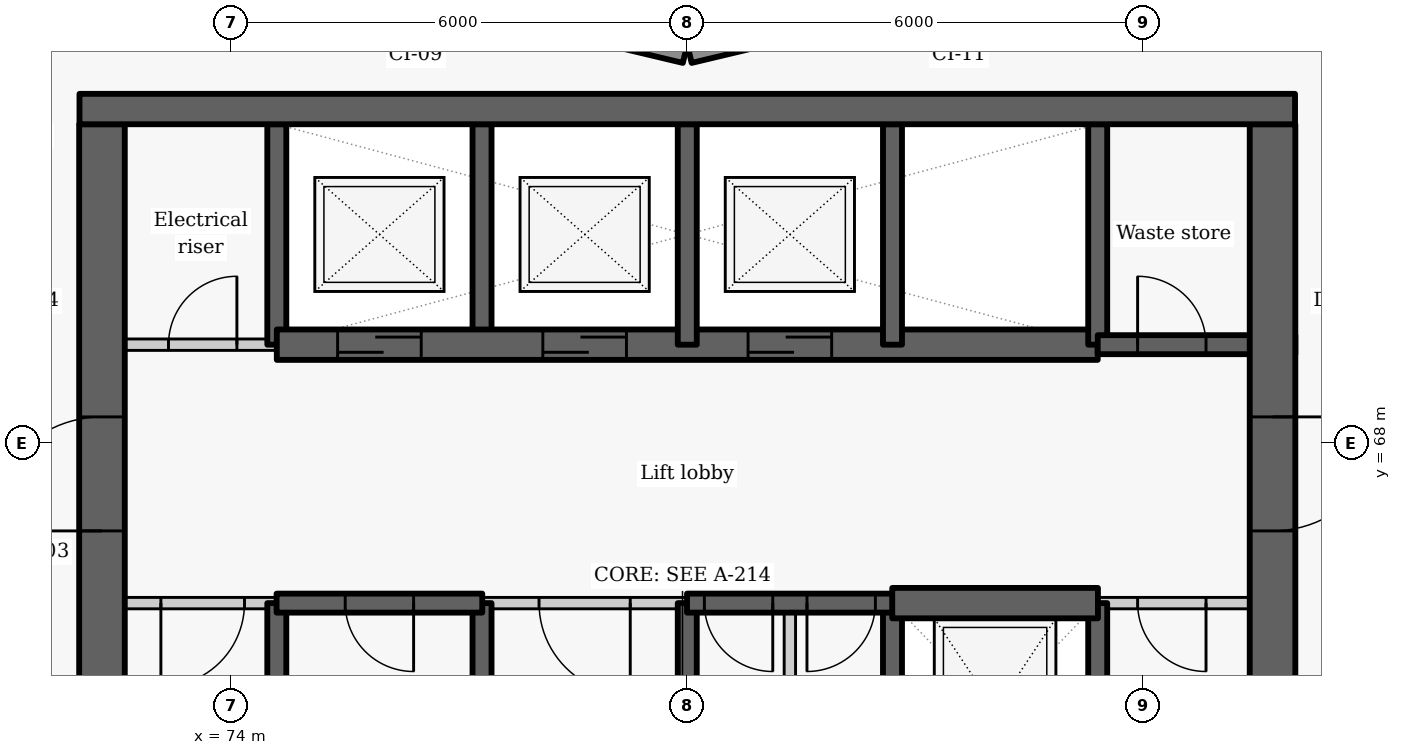
"""IFC4 building model, lengths in metres.
Left out: names, types, materials, properties, quantities, classifications, styles, units other than length and angle.
Written with IfcOpenShell. Run it as: python <this file> out.ifc"""

import sys

from ifc_helpers import new_model, si_unit, direction, frame, frame_2d, origin, place, context, subcontext, project, spatial, rectangle, extrude, element, fill, save


model = new_model("IFC4")
c1 = context("Model", 3, precision=1e-05, world=origin(), true_north=direction((0.0, 1.0)))
c2 = subcontext(c1, "Body", "Model", "MODEL_VIEW")
j1 = project(units=[si_unit("LENGTHUNIT", "METRE"), si_unit("PLANEANGLEUNIT", "RADIAN")], contexts=[c1])
p1 = place(None, origin())
s1 = spatial("IfcSite", under=j1, at=p1, CompositionType="ELEMENT")
p2 = place(p1, origin())
s2 = spatial("IfcBuilding", under=s1, at=p2, CompositionType="ELEMENT")
p3 = place(p2, frame((0.0, 0.0, 67.8)))
s3 = spatial("IfcBuildingStorey", under=s2, at=p3, CompositionType="ELEMENT", Elevation=67.8)
for number, where, z_axis, x_axis in (
    (1, (83.186, 73.881, 0.0), (0.0, 0.0, 1.0), (-0.973, -0.232, 0.0)),
    (2, (79.971, 73.128, 0.0), (0.0, 0.0, 1.0), (-0.973, 0.232, 0.0)),
):
    element("IfcWall", number, at=place(p3, frame(where, z_axis=z_axis, x_axis=x_axis)), inside=s3, PredefinedType="SOLIDWALL", context=c2, shape_type="SweptSolid", body=[
        extrude(rectangle(XDim=3.246, YDim=0.25, at=frame_2d((1.623, 0.0))), origin(), (0.0, 0.0, 1.0), 2.05),
    ])
p4 = place(p3, frame((74.6, 63.1, -0.275), z_axis=(0.0, 0.0, 1.0), x_axis=(0.0, 1.0, 0.0)))
e3 = element("IfcWall", 3, at=p4, inside=s3, PredefinedType="SHEAR", context=c2, shape_type="SweptSolid", body=[
    extrude(rectangle(XDim=2.8, YDim=0.25, at=frame_2d((1.4, 0.0))), origin(), (0.0, 0.0, 1.0), 3.225),
])
p5 = place(p3, frame((74.6, 69.3, -0.275), z_axis=(0.0, 0.0, 1.0), x_axis=(0.0, 1.0, 0.0)))
e4 = element("IfcWall", 4, at=p5, inside=s3, PredefinedType="SHEAR", context=c2, shape_type="SweptSolid", body=[
    extrude(rectangle(XDim=2.9, YDim=0.25, at=frame_2d((1.45, 0.0))), origin(), (0.0, 0.0, 1.0), 3.225),
])
p6 = place(p3, frame((72.0, 69.3, 0.0), z_axis=(0.0, 0.0, 1.0), x_axis=(1.0, 0.0, 0.0)))
e5 = element("IfcWall", 5, at=p6, inside=s3, PredefinedType="PARTITIONING", context=c2, shape_type="SweptSolid", body=[
    extrude(rectangle(XDim=2.6, YDim=0.15, at=frame_2d((1.3, 0.0))), origin(), (0.0, 0.0, 1.0), 2.95),
])
p7 = place(p6, frame((1.175, 0.0, 0.0)))
e6 = element("IfcOpeningElement", 6, at=p7, cuts=e5, PredefinedType="OPENING", context=c2, shape_type="SweptSolid", body=[
    extrude(rectangle(XDim=0.9, YDim=2.1, at=frame_2d((0.45, 1.05))), frame((0.0, 0.085, 0.0), z_axis=(0.0, -1.0, 0.0), x_axis=(1.0, 0.0, 0.0)), (0.0, 0.0, 1.0), 0.17),
])
p8 = place(p3, frame((72.3, 63.1, -0.275), z_axis=(0.0, 0.0, 1.0), x_axis=(0.0, 1.0, 0.0)))
e7 = element("IfcWall", 7, at=p8, inside=s3, PredefinedType="SHEAR", context=c2, shape_type="SweptSolid", body=[
    extrude(rectangle(XDim=9.1, YDim=0.6, at=frame_2d((4.55, 0.0))), origin(), (0.0, 0.0, 1.0), 3.225),
])
p9 = place(p8, frame((3.75, 0.0, 0.275)))
e8 = element("IfcOpeningElement", 8, at=p9, cuts=e7, PredefinedType="OPENING", context=c2, shape_type="SweptSolid", body=[
    extrude(rectangle(XDim=1.5, YDim=2.1, at=frame_2d((0.75, 1.05))), frame((0.0, 0.31, 0.0), z_axis=(0.0, -1.0, 0.0), x_axis=(1.0, 0.0, 0.0)), (0.0, 0.0, 1.0), 0.62),
])
p10 = place(p3, frame((77.3, 63.1, -0.275), z_axis=(0.0, 0.0, 1.0), x_axis=(0.0, 1.0, 0.0)))
e9 = element("IfcWall", 9, at=p10, inside=s3, PredefinedType="SHEAR", context=c2, shape_type="SweptSolid", body=[
    extrude(rectangle(XDim=2.8, YDim=0.25, at=frame_2d((1.4, 0.0))), origin(), (0.0, 0.0, 1.0), 3.225),
])
p11 = place(p3, frame((77.3, 69.3, -0.275), z_axis=(0.0, 0.0, 1.0), x_axis=(0.0, 1.0, 0.0)))
e10 = element("IfcWall", 10, at=p11, inside=s3, PredefinedType="SHEAR", context=c2, shape_type="SweptSolid", body=[
    extrude(rectangle(XDim=2.9, YDim=0.25, at=frame_2d((1.45, 0.0))), origin(), (0.0, 0.0, 1.0), 3.225),
])
p12 = place(p3, frame((74.6, 69.3, -0.275), z_axis=(0.0, 0.0, 1.0), x_axis=(1.0, 0.0, 0.0)))
e11 = element("IfcWall", 11, at=p12, inside=s3, PredefinedType="SHEAR", context=c2, shape_type="SweptSolid", body=[
    extrude(rectangle(XDim=10.8, YDim=0.4, at=frame_2d((5.4, 0.0))), origin(), (0.0, 0.0, 1.0), 3.225),
])
p13 = place(p12, frame((0.8, 0.0, 0.275)))
e12 = element("IfcOpeningElement", 12, at=p13, cuts=e11, PredefinedType="OPENING", context=c2, shape_type="SweptSolid", body=[
    extrude(rectangle(XDim=1.1, YDim=2.1, at=frame_2d((0.55, 1.05))), frame((0.0, 0.21, 0.0), z_axis=(0.0, -1.0, 0.0), x_axis=(1.0, 0.0, 0.0)), (0.0, 0.0, 1.0), 0.42),
])
p14 = place(p12, frame((3.5, 0.0, 0.275)))
e13 = element("IfcOpeningElement", 13, at=p14, cuts=e11, PredefinedType="OPENING", context=c2, shape_type="SweptSolid", body=[
    extrude(rectangle(XDim=1.1, YDim=2.1, at=frame_2d((0.55, 1.05))), frame((0.0, 0.21, 0.0), z_axis=(0.0, -1.0, 0.0), x_axis=(1.0, 0.0, 0.0)), (0.0, 0.0, 1.0), 0.42),
])
p15 = place(p12, frame((6.2, 0.0, 0.275)))
e14 = element("IfcOpeningElement", 14, at=p15, cuts=e11, PredefinedType="OPENING", context=c2, shape_type="SweptSolid", body=[
    extrude(rectangle(XDim=1.1, YDim=2.1, at=frame_2d((0.55, 1.05))), frame((0.0, 0.21, 0.0), z_axis=(0.0, -1.0, 0.0), x_axis=(1.0, 0.0, 0.0)), (0.0, 0.0, 1.0), 0.42),
])
p16 = place(p3, frame((80.0, 63.1, -0.275), z_axis=(0.0, 0.0, 1.0), x_axis=(0.0, 1.0, 0.0)))
e15 = element("IfcWall", 15, at=p16, inside=s3, PredefinedType="SHEAR", context=c2, shape_type="SweptSolid", body=[
    extrude(rectangle(XDim=2.8, YDim=0.25, at=frame_2d((1.4, 0.0))), origin(), (0.0, 0.0, 1.0), 3.225),
])
p17 = place(p3, frame((80.0, 69.3, -0.275), z_axis=(0.0, 0.0, 1.0), x_axis=(0.0, 1.0, 0.0)))
e16 = element("IfcWall", 16, at=p17, inside=s3, PredefinedType="SHEAR", context=c2, shape_type="SweptSolid", body=[
    extrude(rectangle(XDim=2.9, YDim=0.25, at=frame_2d((1.45, 0.0))), origin(), (0.0, 0.0, 1.0), 3.225),
])
p18 = place(p3, frame((82.7, 63.1, -0.275), z_axis=(0.0, 0.0, 1.0), x_axis=(0.0, 1.0, 0.0)))
e17 = element("IfcWall", 17, at=p18, inside=s3, PredefinedType="SHEAR", context=c2, shape_type="SweptSolid", body=[
    extrude(rectangle(XDim=2.8, YDim=0.25, at=frame_2d((1.4, 0.0))), origin(), (0.0, 0.0, 1.0), 3.225),
])
p19 = place(p3, frame((82.7, 69.3, -0.275), z_axis=(0.0, 0.0, 1.0), x_axis=(0.0, 1.0, 0.0)))
e18 = element("IfcWall", 18, at=p19, inside=s3, PredefinedType="SHEAR", context=c2, shape_type="SweptSolid", body=[
    extrude(rectangle(XDim=2.9, YDim=0.25, at=frame_2d((1.45, 0.0))), origin(), (0.0, 0.0, 1.0), 3.225),
])
p20 = place(p3, frame((85.4, 63.1, -0.275), z_axis=(0.0, 0.0, 1.0), x_axis=(0.0, 1.0, 0.0)))
e19 = element("IfcWall", 19, at=p20, inside=s3, PredefinedType="SHEAR", context=c2, shape_type="SweptSolid", body=[
    extrude(rectangle(XDim=2.8, YDim=0.25, at=frame_2d((1.4, 0.0))), origin(), (0.0, 0.0, 1.0), 3.225),
])
p21 = place(p3, frame((85.4, 69.3, -0.275), z_axis=(0.0, 0.0, 1.0), x_axis=(0.0, 1.0, 0.0)))
e20 = element("IfcWall", 20, at=p21, inside=s3, PredefinedType="SHEAR", context=c2, shape_type="SweptSolid", body=[
    extrude(rectangle(XDim=2.9, YDim=0.25, at=frame_2d((1.45, 0.0))), origin(), (0.0, 0.0, 1.0), 3.225),
])
p22 = place(p3, frame((85.4, 69.3, -0.275), z_axis=(0.0, 0.0, 1.0), x_axis=(1.0, 0.0, 0.0)))
e21 = element("IfcWall", 21, at=p22, inside=s3, PredefinedType="SHEAR", context=c2, shape_type="SweptSolid", body=[
    extrude(rectangle(XDim=2.6, YDim=0.25, at=frame_2d((1.3, 0.0))), origin(), (0.0, 0.0, 1.0), 3.225),
])
p23 = place(p22, frame((0.525, 0.0, 0.275)))
e22 = element("IfcOpeningElement", 22, at=p23, cuts=e21, PredefinedType="OPENING", context=c2, shape_type="SweptSolid", body=[
    extrude(rectangle(XDim=0.9, YDim=2.1, at=frame_2d((0.45, 1.05))), frame((0.0, 0.135, 0.0), z_axis=(0.0, -1.0, 0.0), x_axis=(1.0, 0.0, 0.0)), (0.0, 0.0, 1.0), 0.27),
])
p24 = place(p3, frame((87.7, 72.2, -0.275), z_axis=(0.0, 0.0, 1.0), x_axis=(0.0, -1.0, 0.0)))
e23 = element("IfcWall", 23, at=p24, inside=s3, PredefinedType="SHEAR", context=c2, shape_type="SweptSolid", body=[
    extrude(rectangle(XDim=15.6, YDim=0.6, at=frame_2d((7.8, 0.0))), origin(), (0.0, 0.0, 1.0), 3.225),
])
p25 = place(p24, frame((3.85, 0.0, 0.275)))
e24 = element("IfcOpeningElement", 24, at=p25, cuts=e23, PredefinedType="OPENING", context=c2, shape_type="SweptSolid", body=[
    extrude(rectangle(XDim=1.5, YDim=2.1, at=frame_2d((0.75, 1.05))), frame((0.0, 0.31, 0.0), z_axis=(0.0, -1.0, 0.0), x_axis=(1.0, 0.0, 0.0)), (0.0, 0.0, 1.0), 0.62),
])
p26 = place(p24, frame((11.8, 0.0, 0.275)))
e25 = element("IfcOpeningElement", 25, at=p26, cuts=e23, PredefinedType="OPENING", context=c2, shape_type="SweptSolid", body=[
    extrude(rectangle(XDim=1.1, YDim=2.1, at=frame_2d((0.55, 1.05))), frame((0.0, 0.31, 0.0), z_axis=(0.0, -1.0, 0.0), x_axis=(1.0, 0.0, 0.0)), (0.0, 0.0, 1.0), 0.62),
])
p27 = place(p3, frame((74.603, 65.9, 0.0), z_axis=(0.0, 0.0, 1.0), x_axis=(-1.0, 0.0, 0.0)))
e26 = element("IfcWall", 26, at=p27, inside=s3, PredefinedType="PARTITIONING", context=c2, shape_type="SweptSolid", body=[
    extrude(rectangle(XDim=2.603, YDim=0.15, at=frame_2d((1.302, 0.0))), origin(), (0.0, 0.0, 1.0), 2.95),
])
p28 = place(p27, frame((0.428, 0.0, 0.0)))
e27 = element("IfcOpeningElement", 27, at=p28, cuts=e26, PredefinedType="OPENING", context=c2, shape_type="SweptSolid", body=[
    extrude(rectangle(XDim=1.1, YDim=2.1, at=frame_2d((0.55, 1.05))), frame((0.0, 0.085, 0.0), z_axis=(0.0, -1.0, 0.0), x_axis=(1.0, 0.0, 0.0)), (0.0, 0.0, 1.0), 0.17),
])
p29 = place(p3, frame((80.003, 65.9, 0.0), z_axis=(0.0, 0.0, 1.0), x_axis=(-1.0, 0.0, 0.0)))
e28 = element("IfcWall", 28, at=p29, inside=s3, PredefinedType="PARTITIONING", context=c2, shape_type="SweptSolid", body=[
    extrude(rectangle(XDim=2.706, YDim=0.15, at=frame_2d((1.353, 0.0))), origin(), (0.0, 0.0, 1.0), 2.95),
])
p30 = place(p29, frame((0.753, 0.0, 0.0)))
e29 = element("IfcOpeningElement", 29, at=p30, cuts=e28, PredefinedType="OPENING", context=c2, shape_type="SweptSolid", body=[
    extrude(rectangle(XDim=1.2, YDim=2.1, at=frame_2d((0.6, 1.05))), frame((0.0, 0.085, 0.0), z_axis=(0.0, -1.0, 0.0), x_axis=(1.0, 0.0, 0.0)), (0.0, 0.0, 1.0), 0.17),
])
p31 = place(p3, frame((88.0, 65.9, 0.0), z_axis=(0.0, 0.0, 1.0), x_axis=(-1.0, 0.0, 0.0)))
e30 = element("IfcWall", 30, at=p31, inside=s3, PredefinedType="PARTITIONING", context=c2, shape_type="SweptSolid", body=[
    extrude(rectangle(XDim=2.603, YDim=0.15, at=frame_2d((1.302, 0.0))), origin(), (0.0, 0.0, 1.0), 2.95),
])
p32 = place(p31, frame((1.175, 0.0, 0.0)))
e31 = element("IfcOpeningElement", 31, at=p32, cuts=e30, PredefinedType="OPENING", context=c2, shape_type="SweptSolid", body=[
    extrude(rectangle(XDim=0.9, YDim=2.1, at=frame_2d((0.45, 1.05))), frame((0.0, 0.085, 0.0), z_axis=(0.0, -1.0, 0.0), x_axis=(1.0, 0.0, 0.0)), (0.0, 0.0, 1.0), 0.17),
])
p33 = place(p3, frame((77.303, 65.9, -0.275), z_axis=(0.0, 0.0, 1.0), x_axis=(-1.0, 0.0, 0.0)))
e32 = element("IfcWall", 32, at=p33, inside=s3, PredefinedType="SHEAR", context=c2, shape_type="SweptSolid", body=[
    extrude(rectangle(XDim=2.706, YDim=0.25, at=frame_2d((1.353, 0.0))), origin(), (0.0, 0.0, 1.0), 3.225),
])
p34 = place(p33, frame((0.903, 0.0, 0.275)))
e33 = element("IfcOpeningElement", 33, at=p34, cuts=e32, PredefinedType="OPENING", context=c2, shape_type="SweptSolid", body=[
    extrude(rectangle(XDim=0.9, YDim=2.1, at=frame_2d((0.45, 1.05))), frame((0.0, 0.135, 0.0), z_axis=(0.0, -1.0, 0.0), x_axis=(1.0, 0.0, 0.0)), (0.0, 0.0, 1.0), 0.27),
])
p35 = place(p3, frame((82.703, 65.9, -0.275), z_axis=(0.0, 0.0, 1.0), x_axis=(-1.0, 0.0, 0.0)))
e34 = element("IfcWall", 34, at=p35, inside=s3, PredefinedType="SHEAR", context=c2, shape_type="SweptSolid", body=[
    extrude(rectangle(XDim=2.706, YDim=0.25, at=frame_2d((1.353, 0.0))), origin(), (0.0, 0.0, 1.0), 3.225),
])
p36 = place(p35, frame((1.578, 0.0, 0.275)))
e35 = element("IfcOpeningElement", 35, at=p36, cuts=e34, PredefinedType="OPENING", context=c2, shape_type="SweptSolid", body=[
    extrude(rectangle(XDim=0.9, YDim=2.1, at=frame_2d((0.45, 1.05))), frame((0.0, 0.135, 0.0), z_axis=(0.0, -1.0, 0.0), x_axis=(1.0, 0.0, 0.0)), (0.0, 0.0, 1.0), 0.27),
])
p37 = place(p35, frame((0.228, 0.0, 0.275)))
e36 = element("IfcOpeningElement", 36, at=p37, cuts=e34, PredefinedType="OPENING", context=c2, shape_type="SweptSolid", body=[
    extrude(rectangle(XDim=0.9, YDim=2.1, at=frame_2d((0.45, 1.05))), frame((0.0, 0.135, 0.0), z_axis=(0.0, -1.0, 0.0), x_axis=(1.0, 0.0, 0.0)), (0.0, 0.0, 1.0), 0.27),
])
p38 = place(p3, frame((82.697, 65.9, -0.275), z_axis=(0.0, 0.0, 1.0), x_axis=(1.0, 0.0, 0.0)))
e37 = element("IfcWall", 37, at=p38, inside=s3, PredefinedType="SHEAR", context=c2, shape_type="SweptSolid", body=[
    extrude(rectangle(XDim=2.706, YDim=0.4, at=frame_2d((1.353, 0.0))), origin(), (0.0, 0.0, 1.0), 3.225),
])
p39 = place(p3, frame((81.35, 63.1, 0.0), z_axis=(0.0, 0.0, 1.0), x_axis=(0.0, 1.0, 0.0)))
e38 = element("IfcWall", 38, at=p39, inside=s3, PredefinedType="PARTITIONING", context=c2, shape_type="SweptSolid", body=[
    extrude(rectangle(XDim=2.8, YDim=0.15, at=frame_2d((1.4, 0.0))), origin(), (0.0, 0.0, 1.0), 2.95),
])
p40 = place(p3, frame((72.004, 72.4, -0.275), z_axis=(0.0, 0.0, 1.0), x_axis=(1.0, 0.0, 0.0)))
e39 = element("IfcWall", 39, at=p40, inside=s3, PredefinedType="SHEAR", context=c2, shape_type="SweptSolid", body=[
    extrude(rectangle(XDim=15.992, YDim=0.4, at=frame_2d((7.996, 0.0))), origin(), (0.0, 0.0, 1.0), 3.225),
])
p41 = place(p7, origin())
e40 = element("IfcDoor", 40, at=p41, inside=s3, OperationType="SINGLE_SWING_RIGHT", PredefinedType="DOOR", context=c2, shape_type="SweptSolid", body=[
    extrude(rectangle(XDim=0.9, YDim=2.1, at=frame_2d((0.45, 1.05))), frame((0.0, 0.025, 0.0), z_axis=(0.0, -1.0, 0.0), x_axis=(1.0, 0.0, 0.0)), (0.0, 0.0, 1.0), 0.05),
])
fill(e6, e40)
p42 = place(p13, origin())
e41 = element("IfcDoor", 41, at=p42, inside=s3, OperationType="SLIDING_TO_LEFT", PredefinedType="DOOR", context=c2, shape_type="SweptSolid", body=[
    extrude(rectangle(XDim=1.1, YDim=2.1, at=frame_2d((0.55, 1.05))), frame((0.0, 0.025, 0.0), z_axis=(0.0, -1.0, 0.0), x_axis=(1.0, 0.0, 0.0)), (0.0, 0.0, 1.0), 0.05),
])
fill(e12, e41)
p43 = place(p14, origin())
e42 = element("IfcDoor", 42, at=p43, inside=s3, OperationType="SLIDING_TO_LEFT", PredefinedType="DOOR", context=c2, shape_type="SweptSolid", body=[
    extrude(rectangle(XDim=1.1, YDim=2.1, at=frame_2d((0.55, 1.05))), frame((0.0, 0.025, 0.0), z_axis=(0.0, -1.0, 0.0), x_axis=(1.0, 0.0, 0.0)), (0.0, 0.0, 1.0), 0.05),
])
fill(e13, e42)
p44 = place(p15, origin())
e43 = element("IfcDoor", 43, at=p44, inside=s3, OperationType="SLIDING_TO_LEFT", PredefinedType="DOOR", context=c2, shape_type="SweptSolid", body=[
    extrude(rectangle(XDim=1.1, YDim=2.1, at=frame_2d((0.55, 1.05))), frame((0.0, 0.025, 0.0), z_axis=(0.0, -1.0, 0.0), x_axis=(1.0, 0.0, 0.0)), (0.0, 0.0, 1.0), 0.05),
])
fill(e14, e43)
p45 = place(p23, origin())
e44 = element("IfcDoor", 44, at=p45, inside=s3, OperationType="SINGLE_SWING_LEFT", PredefinedType="DOOR", context=c2, shape_type="SweptSolid", body=[
    extrude(rectangle(XDim=0.9, YDim=2.1, at=frame_2d((0.45, 1.05))), frame((0.0, 0.025, 0.0), z_axis=(0.0, -1.0, 0.0), x_axis=(1.0, 0.0, 0.0)), (0.0, 0.0, 1.0), 0.05),
])
fill(e22, e44)
p46 = place(p28, origin())
e45 = element("IfcDoor", 45, at=p46, inside=s3, OperationType="SINGLE_SWING_RIGHT", PredefinedType="DOOR", context=c2, shape_type="SweptSolid", body=[
    extrude(rectangle(XDim=1.1, YDim=2.1, at=frame_2d((0.55, 1.05))), frame((0.0, 0.025, 0.0), z_axis=(0.0, -1.0, 0.0), x_axis=(1.0, 0.0, 0.0)), (0.0, 0.0, 1.0), 0.05),
])
fill(e27, e45)
p47 = place(p34, origin())
e46 = element("IfcDoor", 46, at=p47, inside=s3, OperationType="SINGLE_SWING_LEFT", PredefinedType="DOOR", context=c2, shape_type="SweptSolid", body=[
    extrude(rectangle(XDim=0.9, YDim=2.1, at=frame_2d((0.45, 1.05))), frame((0.0, 0.025, 0.0), z_axis=(0.0, -1.0, 0.0), x_axis=(1.0, 0.0, 0.0)), (0.0, 0.0, 1.0), 0.05),
])
fill(e33, e46)
p48 = place(p30, origin())
e47 = element("IfcDoor", 47, at=p48, inside=s3, OperationType="DOUBLE_DOOR_SINGLE_SWING", PredefinedType="DOOR", context=c2, shape_type="SweptSolid", body=[
    extrude(rectangle(XDim=1.2, YDim=2.1, at=frame_2d((0.6, 1.05))), frame((0.0, 0.025, 0.0), z_axis=(0.0, -1.0, 0.0), x_axis=(1.0, 0.0, 0.0)), (0.0, 0.0, 1.0), 0.05),
])
fill(e29, e47)
p49 = place(p36, origin())
e48 = element("IfcDoor", 48, at=p49, inside=s3, OperationType="SINGLE_SWING_LEFT", PredefinedType="DOOR", context=c2, shape_type="SweptSolid", body=[
    extrude(rectangle(XDim=0.9, YDim=2.1, at=frame_2d((0.45, 1.05))), frame((0.0, 0.025, 0.0), z_axis=(0.0, -1.0, 0.0), x_axis=(1.0, 0.0, 0.0)), (0.0, 0.0, 1.0), 0.05),
])
fill(e35, e48)
p50 = place(p37, origin())
e49 = element("IfcDoor", 49, at=p50, inside=s3, OperationType="SINGLE_SWING_RIGHT", PredefinedType="DOOR", context=c2, shape_type="SweptSolid", body=[
    extrude(rectangle(XDim=0.9, YDim=2.1, at=frame_2d((0.45, 1.05))), frame((0.0, 0.025, 0.0), z_axis=(0.0, -1.0, 0.0), x_axis=(1.0, 0.0, 0.0)), (0.0, 0.0, 1.0), 0.05),
])
fill(e36, e49)
p51 = place(p32, origin())
e50 = element("IfcDoor", 50, at=p51, inside=s3, OperationType="SINGLE_SWING_LEFT", PredefinedType="DOOR", context=c2, shape_type="SweptSolid", body=[
    extrude(rectangle(XDim=0.9, YDim=2.1, at=frame_2d((0.45, 1.05))), frame((0.0, 0.025, 0.0), z_axis=(0.0, -1.0, 0.0), x_axis=(1.0, 0.0, 0.0)), (0.0, 0.0, 1.0), 0.05),
])
fill(e31, e50)
p52 = place(p25, origin())
e51 = element("IfcDoor", 51, at=p52, inside=s3, OperationType="DOUBLE_DOOR_SINGLE_SWING", PredefinedType="DOOR", context=c2, shape_type="SweptSolid", body=[
    extrude(rectangle(XDim=1.5, YDim=2.1, at=frame_2d((0.75, 1.05))), frame((0.0, 0.025, 0.0), z_axis=(0.0, -1.0, 0.0), x_axis=(1.0, 0.0, 0.0)), (0.0, 0.0, 1.0), 0.05),
])
fill(e24, e51)
p53 = place(p9, origin())
e52 = element("IfcDoor", 52, at=p53, inside=s3, OperationType="DOUBLE_DOOR_SINGLE_SWING", PredefinedType="DOOR", context=c2, shape_type="SweptSolid", body=[
    extrude(rectangle(XDim=1.5, YDim=2.1, at=frame_2d((0.75, 1.05))), frame((0.0, 0.025, 0.0), z_axis=(0.0, -1.0, 0.0), x_axis=(1.0, 0.0, 0.0)), (0.0, 0.0, 1.0), 0.05),
])
fill(e8, e52)
save(model, sys.argv[1])
